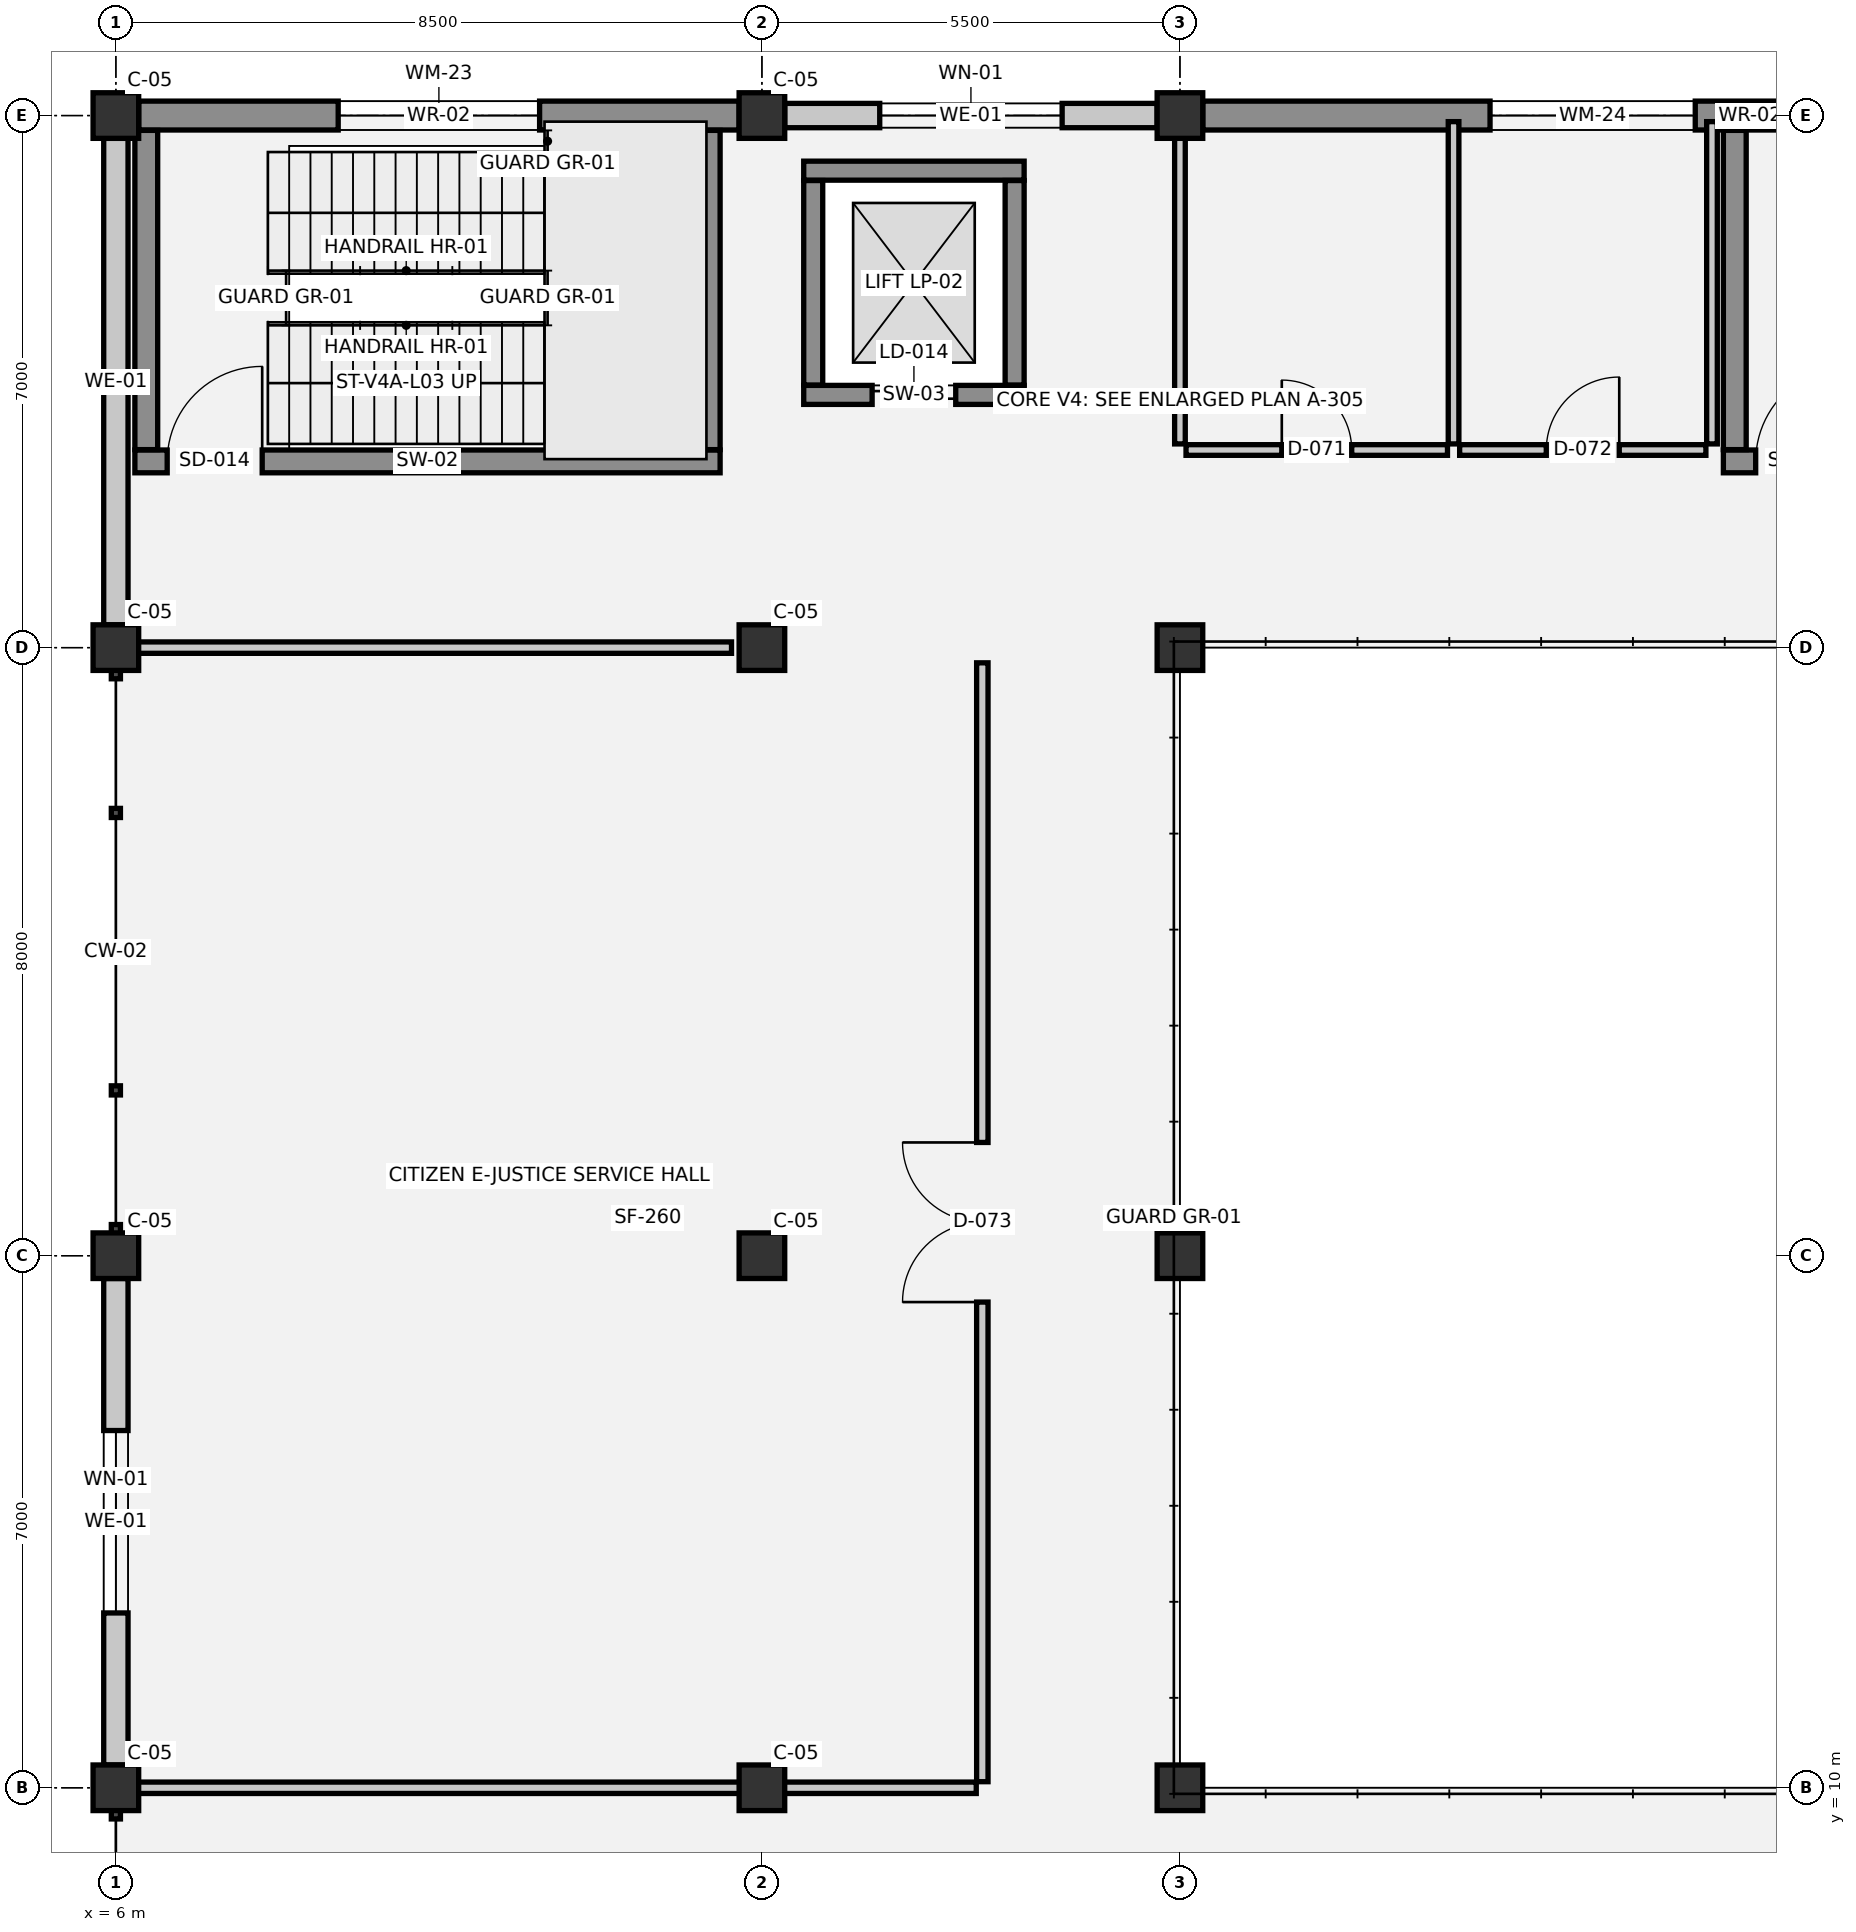
"""IFC4 building model, lengths in metres.
Left out: names, types, materials, properties, quantities, classifications, styles, units other than length and angle.
Written with IfcOpenShell. Run it as: python <this file> out.ifc"""

import sys

from ifc_helpers import new_model, si_unit, direction, frame, frame_2d, origin, origin_2d, place, context, subcontext, project, spatial, rectangle, extrude, element, fill, save


model = new_model("IFC4")
c1 = context("Model", 3, precision=1e-05, world=origin(), true_north=direction((0.0, 1.0)))
c2 = subcontext(c1, "Body", "Model", "MODEL_VIEW")
j1 = project(units=[si_unit("LENGTHUNIT", "METRE"), si_unit("PLANEANGLEUNIT", "RADIAN")], contexts=[c1])
p1 = place(None, origin())
s1 = spatial("IfcSite", under=j1, at=p1, CompositionType="ELEMENT")
p2 = place(p1, origin())
s2 = spatial("IfcBuilding", under=s1, at=p2, CompositionType="ELEMENT")
p3 = place(p2, frame((0.0, 0.0, 9.9)))
s3 = spatial("IfcBuildingStorey", under=s2, at=p3, CompositionType="ELEMENT", Elevation=9.9)
for number, where, z_axis, x_axis in (
    (1, (6.0, 10.0, 0.0), (0.0, 0.0, 1.0), (1.0, 0.0, 0.0)),
    (2, (6.0, 17.0, 0.0), (0.0, 0.0, 1.0), (1.0, 0.0, 0.0)),
    (3, (6.0, 25.0, 0.0), (0.0, 0.0, 1.0), (1.0, 0.0, 0.0)),
    (4, (6.0, 32.0, 0.0), (0.0, 0.0, 1.0), (1.0, 0.0, 0.0)),
    (5, (14.5, 10.0, 0.0), (0.0, 0.0, 1.0), (1.0, 0.0, 0.0)),
    (6, (14.5, 17.0, 0.0), (0.0, 0.0, 1.0), (1.0, 0.0, 0.0)),
    (7, (14.5, 25.0, 0.0), (0.0, 0.0, 1.0), (1.0, 0.0, 0.0)),
    (8, (14.5, 32.0, 0.0), (0.0, 0.0, 1.0), (1.0, 0.0, 0.0)),
    (9, (20.0, 10.0, 0.0), (0.0, 0.0, 1.0), (1.0, 0.0, 0.0)),
    (10, (20.0, 17.0, 0.0), (0.0, 0.0, 1.0), (1.0, 0.0, 0.0)),
    (11, (20.0, 25.0, 0.0), (0.0, 0.0, 1.0), (1.0, 0.0, 0.0)),
    (12, (20.0, 32.0, 0.0), (0.0, 0.0, 1.0), (1.0, 0.0, 0.0)),
):
    element("IfcColumn", number, at=place(p3, frame(where, z_axis=z_axis, x_axis=x_axis)), inside=s3, PredefinedType="COLUMN", context=c2, shape_type="SweptSolid", body=[
        extrude(rectangle(XDim=0.6, YDim=0.6, at=origin_2d()), origin(), (0.0, 0.0, 1.0), 4.5),
    ])
p4 = place(p3, frame((6.0, 10.3, 0.0), z_axis=(0.0, 0.0, 1.0), x_axis=(0.0, 1.0, 0.0)))
e13 = element("IfcWall", 13, at=p4, inside=s3, PredefinedType="SOLIDWALL", context=c2, shape_type="SweptSolid", body=[
    extrude(rectangle(XDim=6.4, YDim=0.32, at=frame_2d((3.2, 0.0))), origin(), (0.0, 0.0, 1.0), 3.26),
])
p5 = place(p4, frame((2.0, 0.0, 0.9)))
e14 = element("IfcOpeningElement", 14, at=p5, cuts=e13, PredefinedType="OPENING", context=c2, shape_type="SweptSolid", body=[
    extrude(rectangle(XDim=2.4, YDim=2.1, at=frame_2d((1.2, 1.05))), frame((0.0, 0.17, 0.0), z_axis=(0.0, -1.0, 0.0), x_axis=(1.0, 0.0, 0.0)), (0.0, 0.0, 1.0), 0.34),
])
p6 = place(p3, frame((6.0, 25.3, 0.0), z_axis=(0.0, 0.0, 1.0), x_axis=(0.0, 1.0, 0.0)))
e15 = element("IfcWall", 15, at=p6, inside=s3, PredefinedType="SOLIDWALL", context=c2, shape_type="SweptSolid", body=[
    extrude(rectangle(XDim=6.4, YDim=0.32, at=frame_2d((3.2, 0.0))), origin(), (0.0, 0.0, 1.0), 3.26),
])
p7 = place(p3, frame((6.3, 32.0, 0.0), z_axis=(0.0, 0.0, 1.0), x_axis=(1.0, 0.0, 0.0)))
e16 = element("IfcWall", 16, at=p7, inside=s3, PredefinedType="STANDARD", context=c2, shape_type="SweptSolid", body=[
    extrude(rectangle(XDim=7.9, YDim=0.38, at=frame_2d((3.95, 0.0))), origin(), (0.0, 0.0, 1.0), 3.26),
])
p8 = place(p7, frame((2.625, 0.0, 0.95)))
e17 = element("IfcOpeningElement", 17, at=p8, cuts=e16, PredefinedType="OPENING", context=c2, shape_type="SweptSolid", body=[
    extrude(rectangle(XDim=2.65, YDim=1.2, at=frame_2d((1.325, 0.6))), frame((0.0, 0.2, 0.0), z_axis=(0.0, -1.0, 0.0), x_axis=(1.0, 0.0, 0.0)), (0.0, 0.0, 1.0), 0.4),
])
p9 = place(p3, frame((14.8, 32.0, 0.0), z_axis=(0.0, 0.0, 1.0), x_axis=(1.0, 0.0, 0.0)))
e18 = element("IfcWall", 18, at=p9, inside=s3, PredefinedType="SOLIDWALL", context=c2, shape_type="SweptSolid", body=[
    extrude(rectangle(XDim=4.9, YDim=0.32, at=frame_2d((2.45, 0.0))), origin(), (0.0, 0.0, 1.0), 3.26),
])
p10 = place(p9, frame((1.25, 0.0, 0.9)))
e19 = element("IfcOpeningElement", 19, at=p10, cuts=e18, PredefinedType="OPENING", context=c2, shape_type="SweptSolid", body=[
    extrude(rectangle(XDim=2.4, YDim=2.1, at=frame_2d((1.2, 1.05))), frame((0.0, 0.17, 0.0), z_axis=(0.0, -1.0, 0.0), x_axis=(1.0, 0.0, 0.0)), (0.0, 0.0, 1.0), 0.34),
])
p11 = place(p3, frame((20.3, 32.0, 0.0), z_axis=(0.0, 0.0, 1.0), x_axis=(1.0, 0.0, 0.0)))
e20 = element("IfcWall", 20, at=p11, inside=s3, PredefinedType="STANDARD", context=c2, shape_type="SweptSolid", body=[
    extrude(rectangle(XDim=14.4, YDim=0.38, at=frame_2d((7.2, 0.0))), origin(), (0.0, 0.0, 1.0), 3.26),
])
p12 = place(p11, frame((3.78, 0.0, 0.95)))
e21 = element("IfcOpeningElement", 21, at=p12, cuts=e20, PredefinedType="OPENING", context=c2, shape_type="SweptSolid", body=[
    extrude(rectangle(XDim=2.7, YDim=1.35, at=frame_2d((1.35, 0.675))), frame((0.0, 0.2, 0.0), z_axis=(0.0, -1.0, 0.0), x_axis=(1.0, 0.0, 0.0)), (0.0, 0.0, 1.0), 0.4),
])
p13 = place(p3, frame((15.05, 28.325, 0.0), z_axis=(0.0, 0.0, 1.0), x_axis=(1.0, 0.0, 0.0)))
e22 = element("IfcWall", 22, at=p13, inside=s3, PredefinedType="SHEAR", context=c2, shape_type="SweptSolid", body=[
    extrude(rectangle(XDim=2.9, YDim=0.25, at=frame_2d((1.45, 0.0))), origin(), (0.0, 0.0, 1.0), 4.5),
])
p14 = place(p13, frame((0.9, 0.0, 0.0)))
e23 = element("IfcOpeningElement", 23, at=p14, cuts=e22, PredefinedType="OPENING", context=c2, shape_type="SweptSolid", body=[
    extrude(rectangle(XDim=1.1, YDim=2.15, at=frame_2d((0.55, 1.075))), frame((0.0, 0.135, 0.0), z_axis=(0.0, -1.0, 0.0), x_axis=(1.0, 0.0, 0.0)), (0.0, 0.0, 1.0), 0.27),
])
p15 = place(p3, frame((17.95, 31.275, 0.0), z_axis=(0.0, 0.0, 1.0), x_axis=(-1.0, 0.0, 0.0)))
e24 = element("IfcWall", 24, at=p15, inside=s3, PredefinedType="SHEAR", context=c2, shape_type="SweptSolid", body=[
    extrude(rectangle(XDim=2.9, YDim=0.25, at=frame_2d((1.45, 0.0))), origin(), (0.0, 0.0, 1.0), 4.5),
])
for number, where, z_axis, x_axis in (
    (25, (15.175, 31.145, 0.0), (0.0, 0.0, 1.0), (0.0, -1.0, 0.0)),
    (26, (17.825, 28.455, 0.0), (0.0, 0.0, 1.0), (0.0, 1.0, 0.0)),
):
    element("IfcWall", number, at=place(p3, frame(where, z_axis=z_axis, x_axis=x_axis)), inside=s3, PredefinedType="SHEAR", context=c2, shape_type="SweptSolid", body=[
        extrude(rectangle(XDim=2.69, YDim=0.25, at=frame_2d((1.345, 0.0))), origin(), (0.0, 0.0, 1.0), 4.5),
    ])
p16 = place(p3, frame((6.25, 27.45, 0.0), z_axis=(0.0, 0.0, 1.0), x_axis=(1.0, 0.0, 0.0)))
e27 = element("IfcWall", 27, at=p16, inside=s3, PredefinedType="SHEAR", context=c2, shape_type="SweptSolid", body=[
    extrude(rectangle(XDim=7.7, YDim=0.3, at=frame_2d((3.85, 0.0))), origin(), (0.0, 0.0, 1.0), 4.24),
])
p17 = place(p16, frame((0.425, 0.0, 0.0)))
e28 = element("IfcOpeningElement", 28, at=p17, cuts=e27, PredefinedType="OPENING", context=c2, shape_type="SweptSolid", body=[
    extrude(rectangle(XDim=1.25, YDim=2.15, at=frame_2d((0.625, 1.075))), frame((0.0, 0.16, 0.0), z_axis=(0.0, -1.0, 0.0), x_axis=(1.0, 0.0, 0.0)), (0.0, 0.0, 1.0), 0.32),
])
for number, where, z_axis, x_axis in (
    (29, (6.4, 31.805, 0.0), (0.0, 0.0, 1.0), (0.0, -1.0, 0.0)),
    (30, (13.8, 27.605, 0.0), (0.0, 0.0, 1.0), (0.0, 1.0, 0.0)),
):
    element("IfcWall", number, at=place(p3, frame(where, z_axis=z_axis, x_axis=x_axis)), inside=s3, PredefinedType="SHEAR", context=c2, shape_type="SweptSolid", body=[
        extrude(rectangle(XDim=4.2, YDim=0.3, at=frame_2d((2.1, 0.0))), origin(), (0.0, 0.0, 1.0), 4.24),
    ])
p18 = place(p3, frame((27.15, 27.45, 0.0), z_axis=(0.0, 0.0, 1.0), x_axis=(1.0, 0.0, 0.0)))
e31 = element("IfcWall", 31, at=p18, inside=s3, PredefinedType="SHEAR", context=c2, shape_type="SweptSolid", body=[
    extrude(rectangle(XDim=7.7, YDim=0.3, at=frame_2d((3.85, 0.0))), origin(), (0.0, 0.0, 1.0), 4.24),
])
p19 = place(p18, frame((0.425, 0.0, 0.0)))
e32 = element("IfcOpeningElement", 32, at=p19, cuts=e31, PredefinedType="OPENING", context=c2, shape_type="SweptSolid", body=[
    extrude(rectangle(XDim=1.25, YDim=2.15, at=frame_2d((0.625, 1.075))), frame((0.0, 0.16, 0.0), z_axis=(0.0, -1.0, 0.0), x_axis=(1.0, 0.0, 0.0)), (0.0, 0.0, 1.0), 0.32),
])
p20 = place(p3, frame((27.3, 31.805, 0.0), z_axis=(0.0, 0.0, 1.0), x_axis=(0.0, -1.0, 0.0)))
e33 = element("IfcWall", 33, at=p20, inside=s3, PredefinedType="SHEAR", context=c2, shape_type="SweptSolid", body=[
    extrude(rectangle(XDim=4.2, YDim=0.3, at=frame_2d((2.1, 0.0))), origin(), (0.0, 0.0, 1.0), 4.24),
])
p21 = place(p3, frame((6.08, 10.0, 0.0), z_axis=(0.0, 0.0, 1.0), x_axis=(1.0, 0.0, 0.0)))
e34 = element("IfcWall", 34, at=p21, inside=s3, PredefinedType="PARTITIONING", context=c2, shape_type="SweptSolid", body=[
    extrude(rectangle(XDim=11.24, YDim=0.15, at=frame_2d((5.62, 0.0))), origin(), (0.0, 0.0, 1.0), 3.53),
])
p22 = place(p3, frame((6.08, 25.0, 0.0), z_axis=(0.0, 0.0, 1.0), x_axis=(1.0, 0.0, 0.0)))
e35 = element("IfcWall", 35, at=p22, inside=s3, PredefinedType="PARTITIONING", context=c2, shape_type="SweptSolid", body=[
    extrude(rectangle(XDim=8.02, YDim=0.15, at=frame_2d((4.01, 0.0))), origin(), (0.0, 0.0, 1.0), 3.53),
])
p23 = place(p3, frame((20.08, 27.6, 0.0), z_axis=(0.0, 0.0, 1.0), x_axis=(1.0, 0.0, 0.0)))
e36 = element("IfcWall", 36, at=p23, inside=s3, PredefinedType="PLUMBINGWALL", context=c2, shape_type="SweptSolid", body=[
    extrude(rectangle(XDim=3.44, YDim=0.14, at=frame_2d((1.72, 0.0))), origin(), (0.0, 0.0, 1.0), 4.14),
])
p24 = place(p23, frame((1.26, 0.0, 0.0)))
e37 = element("IfcOpeningElement", 37, at=p24, cuts=e36, PredefinedType="OPENING", context=c2, shape_type="SweptSolid", body=[
    extrude(rectangle(XDim=0.92, YDim=2.1, at=frame_2d((0.46, 1.05))), frame((0.0, 0.08, 0.0), z_axis=(0.0, -1.0, 0.0), x_axis=(1.0, 0.0, 0.0)), (0.0, 0.0, 1.0), 0.16),
])
p25 = place(p3, frame((23.68, 27.6, 0.0), z_axis=(0.0, 0.0, 1.0), x_axis=(1.0, 0.0, 0.0)))
e38 = element("IfcWall", 38, at=p25, inside=s3, PredefinedType="PLUMBINGWALL", context=c2, shape_type="SweptSolid", body=[
    extrude(rectangle(XDim=3.24, YDim=0.14, at=frame_2d((1.62, 0.0))), origin(), (0.0, 0.0, 1.0), 4.14),
])
p26 = place(p25, frame((1.14, 0.0, 0.0)))
e39 = element("IfcOpeningElement", 39, at=p26, cuts=e38, PredefinedType="OPENING", context=c2, shape_type="SweptSolid", body=[
    extrude(rectangle(XDim=0.96, YDim=2.1, at=frame_2d((0.48, 1.05))), frame((0.0, 0.08, 0.0), z_axis=(0.0, -1.0, 0.0), x_axis=(1.0, 0.0, 0.0)), (0.0, 0.0, 1.0), 0.16),
])
p27 = place(p3, frame((17.4, 10.08, 0.0), z_axis=(0.0, 0.0, 1.0), x_axis=(0.0, 1.0, 0.0)))
e40 = element("IfcWall", 40, at=p27, inside=s3, PredefinedType="PARTITIONING", context=c2, shape_type="SweptSolid", body=[
    extrude(rectangle(XDim=14.72, YDim=0.15, at=frame_2d((7.36, 0.0))), origin(), (0.0, 0.0, 1.0), 4.14),
])
p28 = place(p27, frame((6.31, 0.0, 0.0)))
e41 = element("IfcOpeningElement", 41, at=p28, cuts=e40, PredefinedType="OPENING", context=c2, shape_type="SweptSolid", body=[
    extrude(rectangle(XDim=2.1, YDim=2.35, at=frame_2d((1.05, 1.175))), frame((0.0, 0.085, 0.0), z_axis=(0.0, -1.0, 0.0), x_axis=(1.0, 0.0, 0.0)), (0.0, 0.0, 1.0), 0.17),
])
p29 = place(p3, frame((20.0, 27.68, 0.0), z_axis=(0.0, 0.0, 1.0), x_axis=(0.0, 1.0, 0.0)))
e42 = element("IfcWall", 42, at=p29, inside=s3, PredefinedType="PLUMBINGWALL", context=c2, shape_type="SweptSolid", body=[
    extrude(rectangle(XDim=4.24, YDim=0.14, at=frame_2d((2.12, 0.0))), origin(), (0.0, 0.0, 1.0), 3.68),
])
for number, where, z_axis, x_axis in (
    (43, (23.6, 27.68, 0.0), (0.0, 0.0, 1.0), (0.0, 1.0, 0.0)),
    (44, (27.0, 27.68, 0.0), (0.0, 0.0, 1.0), (0.0, 1.0, 0.0)),
):
    element("IfcWall", number, at=place(p3, frame(where, z_axis=z_axis, x_axis=x_axis)), inside=s3, PredefinedType="PLUMBINGWALL", context=c2, shape_type="SweptSolid", body=[
        extrude(rectangle(XDim=4.24, YDim=0.14, at=frame_2d((2.12, 0.0))), origin(), (0.0, 0.0, 1.0), 4.14),
    ])
p30 = place(p5, origin())
e45 = element("IfcWindow", 45, at=p30, inside=s3, PartitioningType="SINGLE_PANEL", PredefinedType="WINDOW", context=c2, shape_type="SweptSolid", body=[
    extrude(rectangle(XDim=2.4, YDim=2.1, at=frame_2d((1.2, 1.05))), frame((0.0, 0.03, 0.0), z_axis=(0.0, -1.0, 0.0), x_axis=(1.0, 0.0, 0.0)), (0.0, 0.0, 1.0), 0.06),
])
fill(e14, e45)
p31 = place(p10, origin())
e46 = element("IfcWindow", 46, at=p31, inside=s3, PartitioningType="SINGLE_PANEL", PredefinedType="WINDOW", context=c2, shape_type="SweptSolid", body=[
    extrude(rectangle(XDim=2.4, YDim=2.1, at=frame_2d((1.2, 1.05))), frame((0.0, 0.03, 0.0), z_axis=(0.0, -1.0, 0.0), x_axis=(1.0, 0.0, 0.0)), (0.0, 0.0, 1.0), 0.06),
])
fill(e19, e46)
p32 = place(p14, origin())
e47 = element("IfcDoor", 47, at=p32, inside=s3, OperationType="DOUBLE_DOOR_SLIDING", PredefinedType="DOOR", context=c2, shape_type="SweptSolid", body=[
    extrude(rectangle(XDim=1.1, YDim=2.15, at=frame_2d((0.55, 1.075))), frame((0.0, 0.025, 0.0), z_axis=(0.0, -1.0, 0.0), x_axis=(1.0, 0.0, 0.0)), (0.0, 0.0, 1.0), 0.05),
])
fill(e23, e47)
p33 = place(p17, origin())
e48 = element("IfcDoor", 48, at=p33, inside=s3, OperationType="SINGLE_SWING_RIGHT", PredefinedType="DOOR", context=c2, shape_type="SweptSolid", body=[
    extrude(rectangle(XDim=1.25, YDim=2.15, at=frame_2d((0.625, 1.075))), frame((0.0, 0.025, 0.0), z_axis=(0.0, -1.0, 0.0), x_axis=(1.0, 0.0, 0.0)), (0.0, 0.0, 1.0), 0.05),
])
fill(e28, e48)
p34 = place(p19, origin())
e49 = element("IfcDoor", 49, at=p34, inside=s3, OperationType="SINGLE_SWING_RIGHT", PredefinedType="DOOR", context=c2, shape_type="SweptSolid", body=[
    extrude(rectangle(XDim=1.25, YDim=2.15, at=frame_2d((0.625, 1.075))), frame((0.0, 0.025, 0.0), z_axis=(0.0, -1.0, 0.0), x_axis=(1.0, 0.0, 0.0)), (0.0, 0.0, 1.0), 0.05),
])
fill(e32, e49)
p35 = place(p24, origin())
e50 = element("IfcDoor", 50, at=p35, inside=s3, OperationType="SINGLE_SWING_LEFT", PredefinedType="DOOR", context=c2, shape_type="SweptSolid", body=[
    extrude(rectangle(XDim=0.92, YDim=2.1, at=frame_2d((0.46, 1.05))), frame((0.0, 0.025, 0.0), z_axis=(0.0, -1.0, 0.0), x_axis=(1.0, 0.0, 0.0)), (0.0, 0.0, 1.0), 0.05),
])
fill(e37, e50)
p36 = place(p26, origin())
e51 = element("IfcDoor", 51, at=p36, inside=s3, OperationType="SINGLE_SWING_RIGHT", PredefinedType="DOOR", context=c2, shape_type="SweptSolid", body=[
    extrude(rectangle(XDim=0.96, YDim=2.1, at=frame_2d((0.48, 1.05))), frame((0.0, 0.025, 0.0), z_axis=(0.0, -1.0, 0.0), x_axis=(1.0, 0.0, 0.0)), (0.0, 0.0, 1.0), 0.05),
])
fill(e39, e51)
p37 = place(p28, origin())
e52 = element("IfcDoor", 52, at=p37, inside=s3, OperationType="DOUBLE_DOOR_SINGLE_SWING", PredefinedType="DOOR", context=c2, shape_type="SweptSolid", body=[
    extrude(rectangle(XDim=2.1, YDim=2.35, at=frame_2d((1.05, 1.175))), frame((0.0, 0.025, 0.0), z_axis=(0.0, -1.0, 0.0), x_axis=(1.0, 0.0, 0.0)), (0.0, 0.0, 1.0), 0.05),
])
fill(e41, e52)
p38 = place(p8, origin())
e53 = element("IfcWindow", 53, at=p38, inside=s3, PartitioningType="SINGLE_PANEL", PredefinedType="WINDOW", context=c2, shape_type="SweptSolid", body=[
    extrude(rectangle(XDim=2.65, YDim=1.2, at=frame_2d((1.325, 0.6))), frame((0.0, 0.03, 0.0), z_axis=(0.0, -1.0, 0.0), x_axis=(1.0, 0.0, 0.0)), (0.0, 0.0, 1.0), 0.06),
])
fill(e17, e53)
p39 = place(p12, origin())
e54 = element("IfcWindow", 54, at=p39, inside=s3, PartitioningType="SINGLE_PANEL", PredefinedType="WINDOW", context=c2, shape_type="SweptSolid", body=[
    extrude(rectangle(XDim=2.7, YDim=1.35, at=frame_2d((1.35, 0.675))), frame((0.0, 0.03, 0.0), z_axis=(0.0, -1.0, 0.0), x_axis=(1.0, 0.0, 0.0)), (0.0, 0.0, 1.0), 0.06),
])
fill(e21, e54)
save(model, sys.argv[1])
